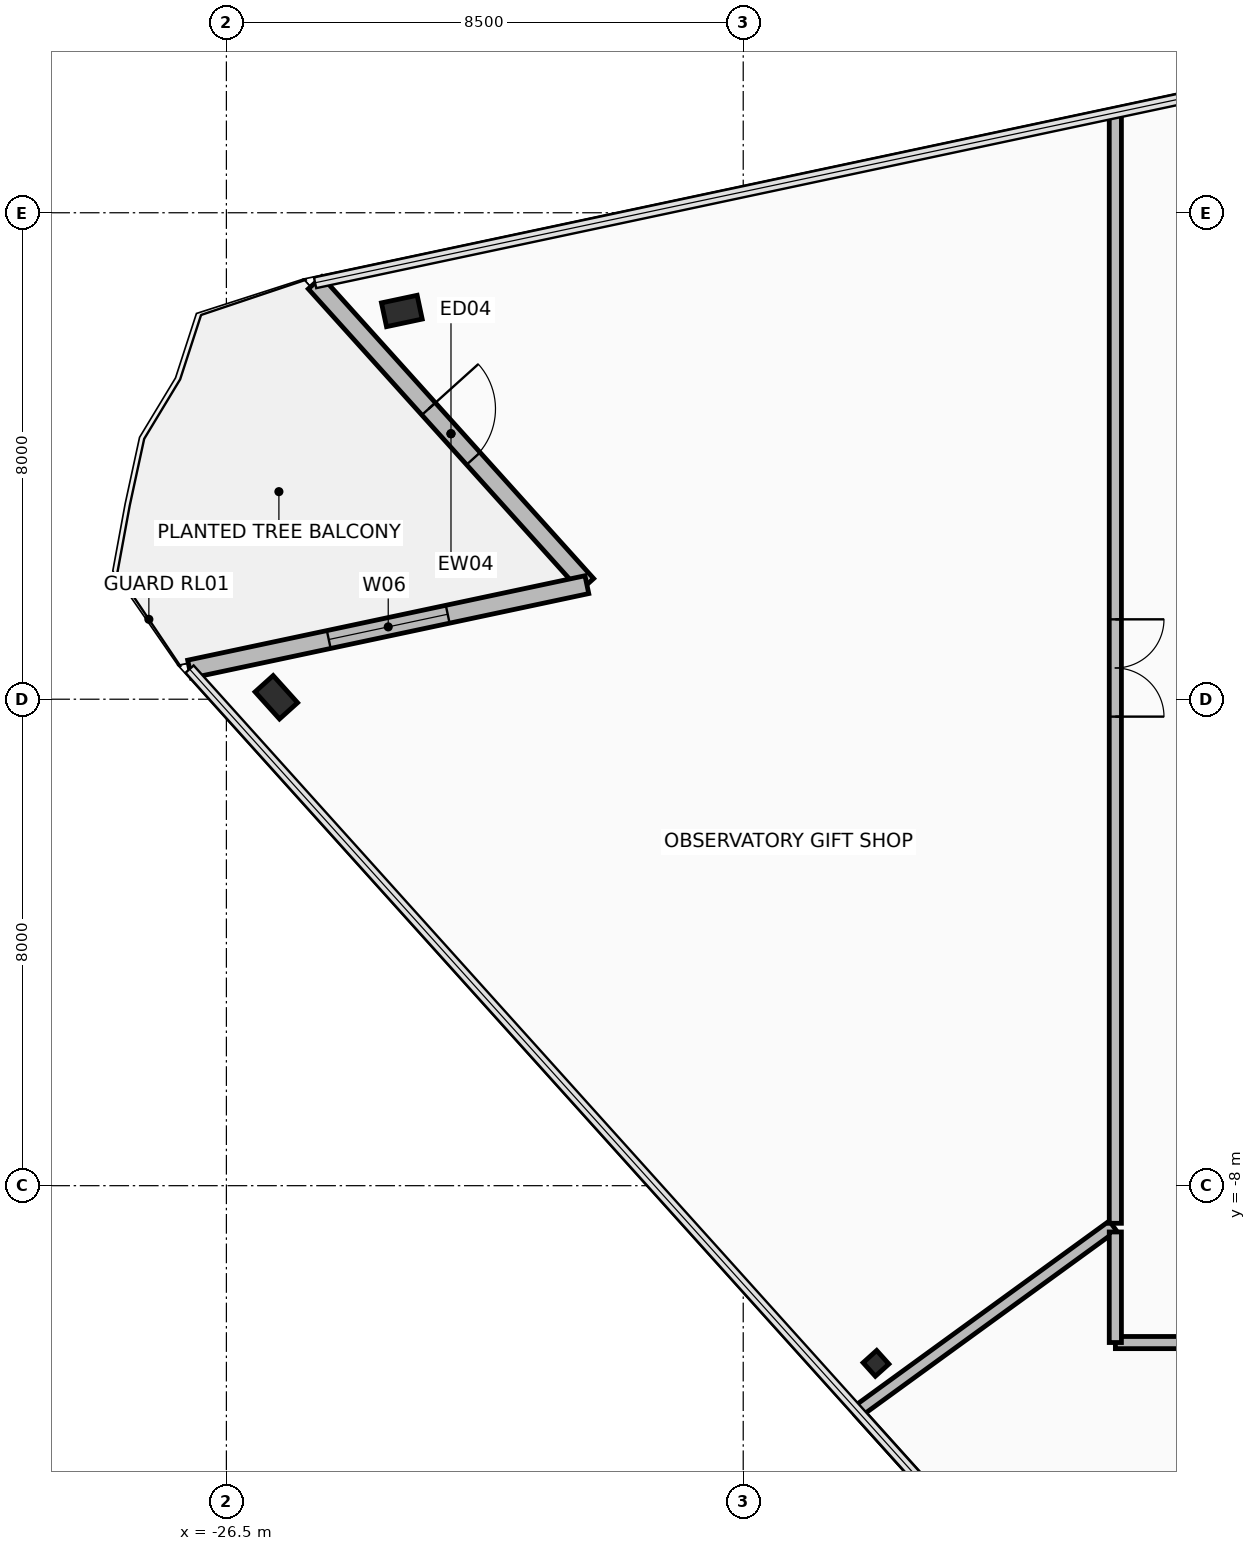
"""IFC4 building model, lengths in metres.
Left out: names, types, materials, properties, quantities, classifications, styles, units other than length and angle.
Written with IfcOpenShell. Run it as: python <this file> out.ifc"""

import sys

from ifc_helpers import new_model, si_unit, direction, frame, frame_2d, origin, origin_2d, place, context, subcontext, project, spatial, rectangle, hollow_rectangle, extrude, element, fill, save


model = new_model("IFC4")
c1 = context("Model", 3, precision=1e-05, world=origin(), true_north=direction((0.0, 1.0)))
c2 = subcontext(c1, "Body", "Model", "MODEL_VIEW")
j1 = project(units=[si_unit("LENGTHUNIT", "METRE"), si_unit("PLANEANGLEUNIT", "RADIAN")], contexts=[c1])
p1 = place(None, origin())
s1 = spatial("IfcSite", under=j1, at=p1, CompositionType="ELEMENT")
p2 = place(p1, origin())
s2 = spatial("IfcBuilding", under=s1, at=p2, CompositionType="ELEMENT")
p3 = place(p2, frame((0.0, 0.0, 302.15)))
s3 = spatial("IfcBuildingStorey", under=s2, at=p3, CompositionType="ELEMENT", Elevation=302.15)
p4 = place(p3, frame((-25.679, 0.032, 0.0), z_axis=(0.0, 0.0, 1.0), x_axis=(-0.669130606359, 0.743144825477, 0.0)))
e1 = element("IfcColumn", 1, at=p4, inside=s3, PredefinedType="COLUMN", context=c2, shape_type="SweptSolid", body=[
    extrude(hollow_rectangle(XDim=0.4, YDim=0.6, WallThickness=0.03, at=origin_2d()), origin(), (0.0, 0.0, 1.0), 4.15),
])
p5 = place(p3, frame((-15.816, -10.922, 0.0), z_axis=(0.0, 0.0, 1.0), x_axis=(-0.669130606359, 0.743144825477, 0.0)))
e2 = element("IfcColumn", 2, at=p5, inside=s3, PredefinedType="COLUMN", context=c2, shape_type="SweptSolid", body=[
    extrude(hollow_rectangle(XDim=0.3, YDim=0.3, WallThickness=0.02, at=origin_2d()), origin(), (0.0, 0.0, 1.0), 4.15),
])
p6 = place(p3, frame((-23.615, 6.385, 0.0), z_axis=(0.0, 0.0, 1.0), x_axis=(0.978147237858, 0.207913398007, 0.0)))
e3 = element("IfcColumn", 3, at=p6, inside=s3, PredefinedType="COLUMN", context=c2, shape_type="SweptSolid", body=[
    extrude(hollow_rectangle(XDim=0.4, YDim=0.6, WallThickness=0.03, at=origin_2d()), origin(), (0.0, 0.0, 1.0), 4.15),
])
p7 = place(p3, frame((-25.041, 6.848, 0.0), z_axis=(0.0, 0.0, 1.0), x_axis=(0.669132313306, -0.743143288532, 0.0)))
e4 = element("IfcWall", 4, at=p7, inside=s3, PredefinedType="STANDARD", context=c2, shape_type="SweptSolid", body=[
    extrude(rectangle(XDim=6.68, YDim=0.3, at=frame_2d((3.34, 0.0))), origin(), (0.0, 0.0, 1.0), 3.295),
])
p8 = place(p7, frame((2.79, 0.0, 0.0)))
e5 = element("IfcOpeningElement", 5, at=p8, cuts=e4, PredefinedType="OPENING", context=c2, shape_type="SweptSolid", body=[
    extrude(rectangle(XDim=1.1, YDim=2.2, at=frame_2d((0.55, 1.1))), frame((0.0, 0.16, 0.0), z_axis=(0.0, -1.0, 0.0), x_axis=(1.0, 0.0, 0.0)), (0.0, 0.0, 1.0), 0.32),
])
p9 = place(p3, frame((-20.571, 1.884, 0.0), z_axis=(0.0, 0.0, 1.0), x_axis=(-0.978145008547, -0.207923885724, 0.0)))
e6 = element("IfcWall", 6, at=p9, inside=s3, PredefinedType="STANDARD", context=c2, shape_type="SweptSolid", body=[
    extrude(rectangle(XDim=6.68, YDim=0.3, at=frame_2d((3.34, 0.0))), origin(), (0.0, 0.0, 1.0), 3.295),
])
p10 = place(p9, frame((2.34, 0.0, 0.715)))
e7 = element("IfcOpeningElement", 7, at=p10, cuts=e6, PredefinedType="OPENING", context=c2, shape_type="SweptSolid", body=[
    extrude(rectangle(XDim=2.0, YDim=2.4, at=frame_2d((1.0, 1.2))), frame((0.0, 0.16, 0.0), z_axis=(0.0, -1.0, 0.0), x_axis=(1.0, 0.0, 0.0)), (0.0, 0.0, 1.0), 0.32),
])
p11 = place(p3, frame((-11.879, -10.58, 0.0), z_axis=(0.0, 0.0, 1.0), x_axis=(1.0, 0.0, 0.0)))
e8 = element("IfcWall", 8, at=p11, inside=s3, PredefinedType="PARTITIONING", context=c2, shape_type="SweptSolid", body=[
    extrude(rectangle(XDim=15.299, YDim=0.2, at=frame_2d((7.649, 0.0))), origin(), (0.0, 0.0, 1.0), 3.445),
])
p12 = place(p11, frame((7.224, 0.0, 0.0)))
e9 = element("IfcOpeningElement", 9, at=p12, cuts=e8, PredefinedType="OPENING", context=c2, shape_type="SweptSolid", body=[
    extrude(rectangle(XDim=0.85, YDim=2.1, at=frame_2d((0.425, 1.05))), frame((0.0, 0.11, 0.0), z_axis=(0.0, -1.0, 0.0), x_axis=(1.0, 0.0, 0.0)), (0.0, 0.0, 1.0), 0.22),
])
p13 = place(p3, frame((4.101, -34.163, 0.0), z_axis=(0.0, 0.0, 1.0), x_axis=(-0.669132723426, 0.743142919256, 0.0)))
e10 = element("IfcWall", 10, at=p13, inside=s3, PredefinedType="PARTITIONING", context=c2, shape_type="SweptSolid", body=[
    extrude(rectangle(XDim=30.187, YDim=0.15, at=frame_2d((15.093, 0.0))), origin(), (0.0, 0.0, 1.0), 3.95),
])
p14 = place(p3, frame((-16.094, -11.693, 0.0), z_axis=(0.0, 0.0, 1.0), x_axis=(0.809026537752, 0.587772116736, 0.0)))
e11 = element("IfcWall", 11, at=p14, inside=s3, PredefinedType="PARTITIONING", context=c2, shape_type="SweptSolid", body=[
    extrude(rectangle(XDim=5.16, YDim=0.2, at=frame_2d((2.58, 0.0))), origin(), (0.0, 0.0, 1.0), 3.295),
])
p15 = place(p3, frame((-11.88, -8.761, 0.0), z_axis=(0.0, 0.0, 1.0), x_axis=(0.0, -1.0, 0.0)))
e12 = element("IfcWall", 12, at=p15, inside=s3, PredefinedType="PARTITIONING", context=c2, shape_type="SweptSolid", body=[
    extrude(rectangle(XDim=1.818, YDim=0.2, at=frame_2d((0.909, 0.0))), origin(), (0.0, 0.0, 1.0), 3.445),
])
p16 = place(p3, frame((-11.88, 9.646, 0.0), z_axis=(0.0, 0.0, 1.0), x_axis=(0.0, -1.0, 0.0)))
e13 = element("IfcWall", 13, at=p16, inside=s3, PredefinedType="PARTITIONING", context=c2, shape_type="SweptSolid", body=[
    extrude(rectangle(XDim=18.264, YDim=0.2, at=frame_2d((9.132, 0.0))), origin(), (0.0, 0.0, 1.0), 3.295),
])
p17 = place(p16, frame((8.332, 0.0, 0.0)))
e14 = element("IfcOpeningElement", 14, at=p17, cuts=e13, PredefinedType="OPENING", context=c2, shape_type="SweptSolid", body=[
    extrude(rectangle(XDim=1.6, YDim=2.2, at=frame_2d((0.8, 1.1))), frame((0.0, 0.11, 0.0), z_axis=(0.0, -1.0, 0.0), x_axis=(1.0, 0.0, 0.0)), (0.0, 0.0, 1.0), 0.22),
])
p18 = place(p8, origin())
e15 = element("IfcDoor", 15, at=p18, inside=s3, OperationType="SINGLE_SWING_LEFT", PredefinedType="DOOR", context=c2, shape_type="SweptSolid", body=[
    extrude(rectangle(XDim=1.1, YDim=2.2, at=frame_2d((0.55, 1.1))), frame((0.0, 0.025, 0.0), z_axis=(0.0, -1.0, 0.0), x_axis=(1.0, 0.0, 0.0)), (0.0, 0.0, 1.0), 0.05),
])
fill(e5, e15)
p19 = place(p10, origin())
e16 = element("IfcWindow", 16, at=p19, inside=s3, PartitioningType="SINGLE_PANEL", PredefinedType="WINDOW", context=c2, shape_type="SweptSolid", body=[
    extrude(rectangle(XDim=2.0, YDim=2.4, at=frame_2d((1.0, 1.2))), frame((0.0, 0.03, 0.0), z_axis=(0.0, -1.0, 0.0), x_axis=(1.0, 0.0, 0.0)), (0.0, 0.0, 1.0), 0.06),
])
fill(e7, e16)
p20 = place(p17, origin())
e17 = element("IfcDoor", 17, at=p20, inside=s3, OperationType="DOUBLE_DOOR_SINGLE_SWING", PredefinedType="DOOR", context=c2, shape_type="SweptSolid", body=[
    extrude(rectangle(XDim=1.6, YDim=2.2, at=frame_2d((0.8, 1.1))), frame((0.0, 0.025, 0.0), z_axis=(0.0, -1.0, 0.0), x_axis=(1.0, 0.0, 0.0)), (0.0, 0.0, 1.0), 0.05),
])
fill(e14, e17)
save(model, sys.argv[1])
